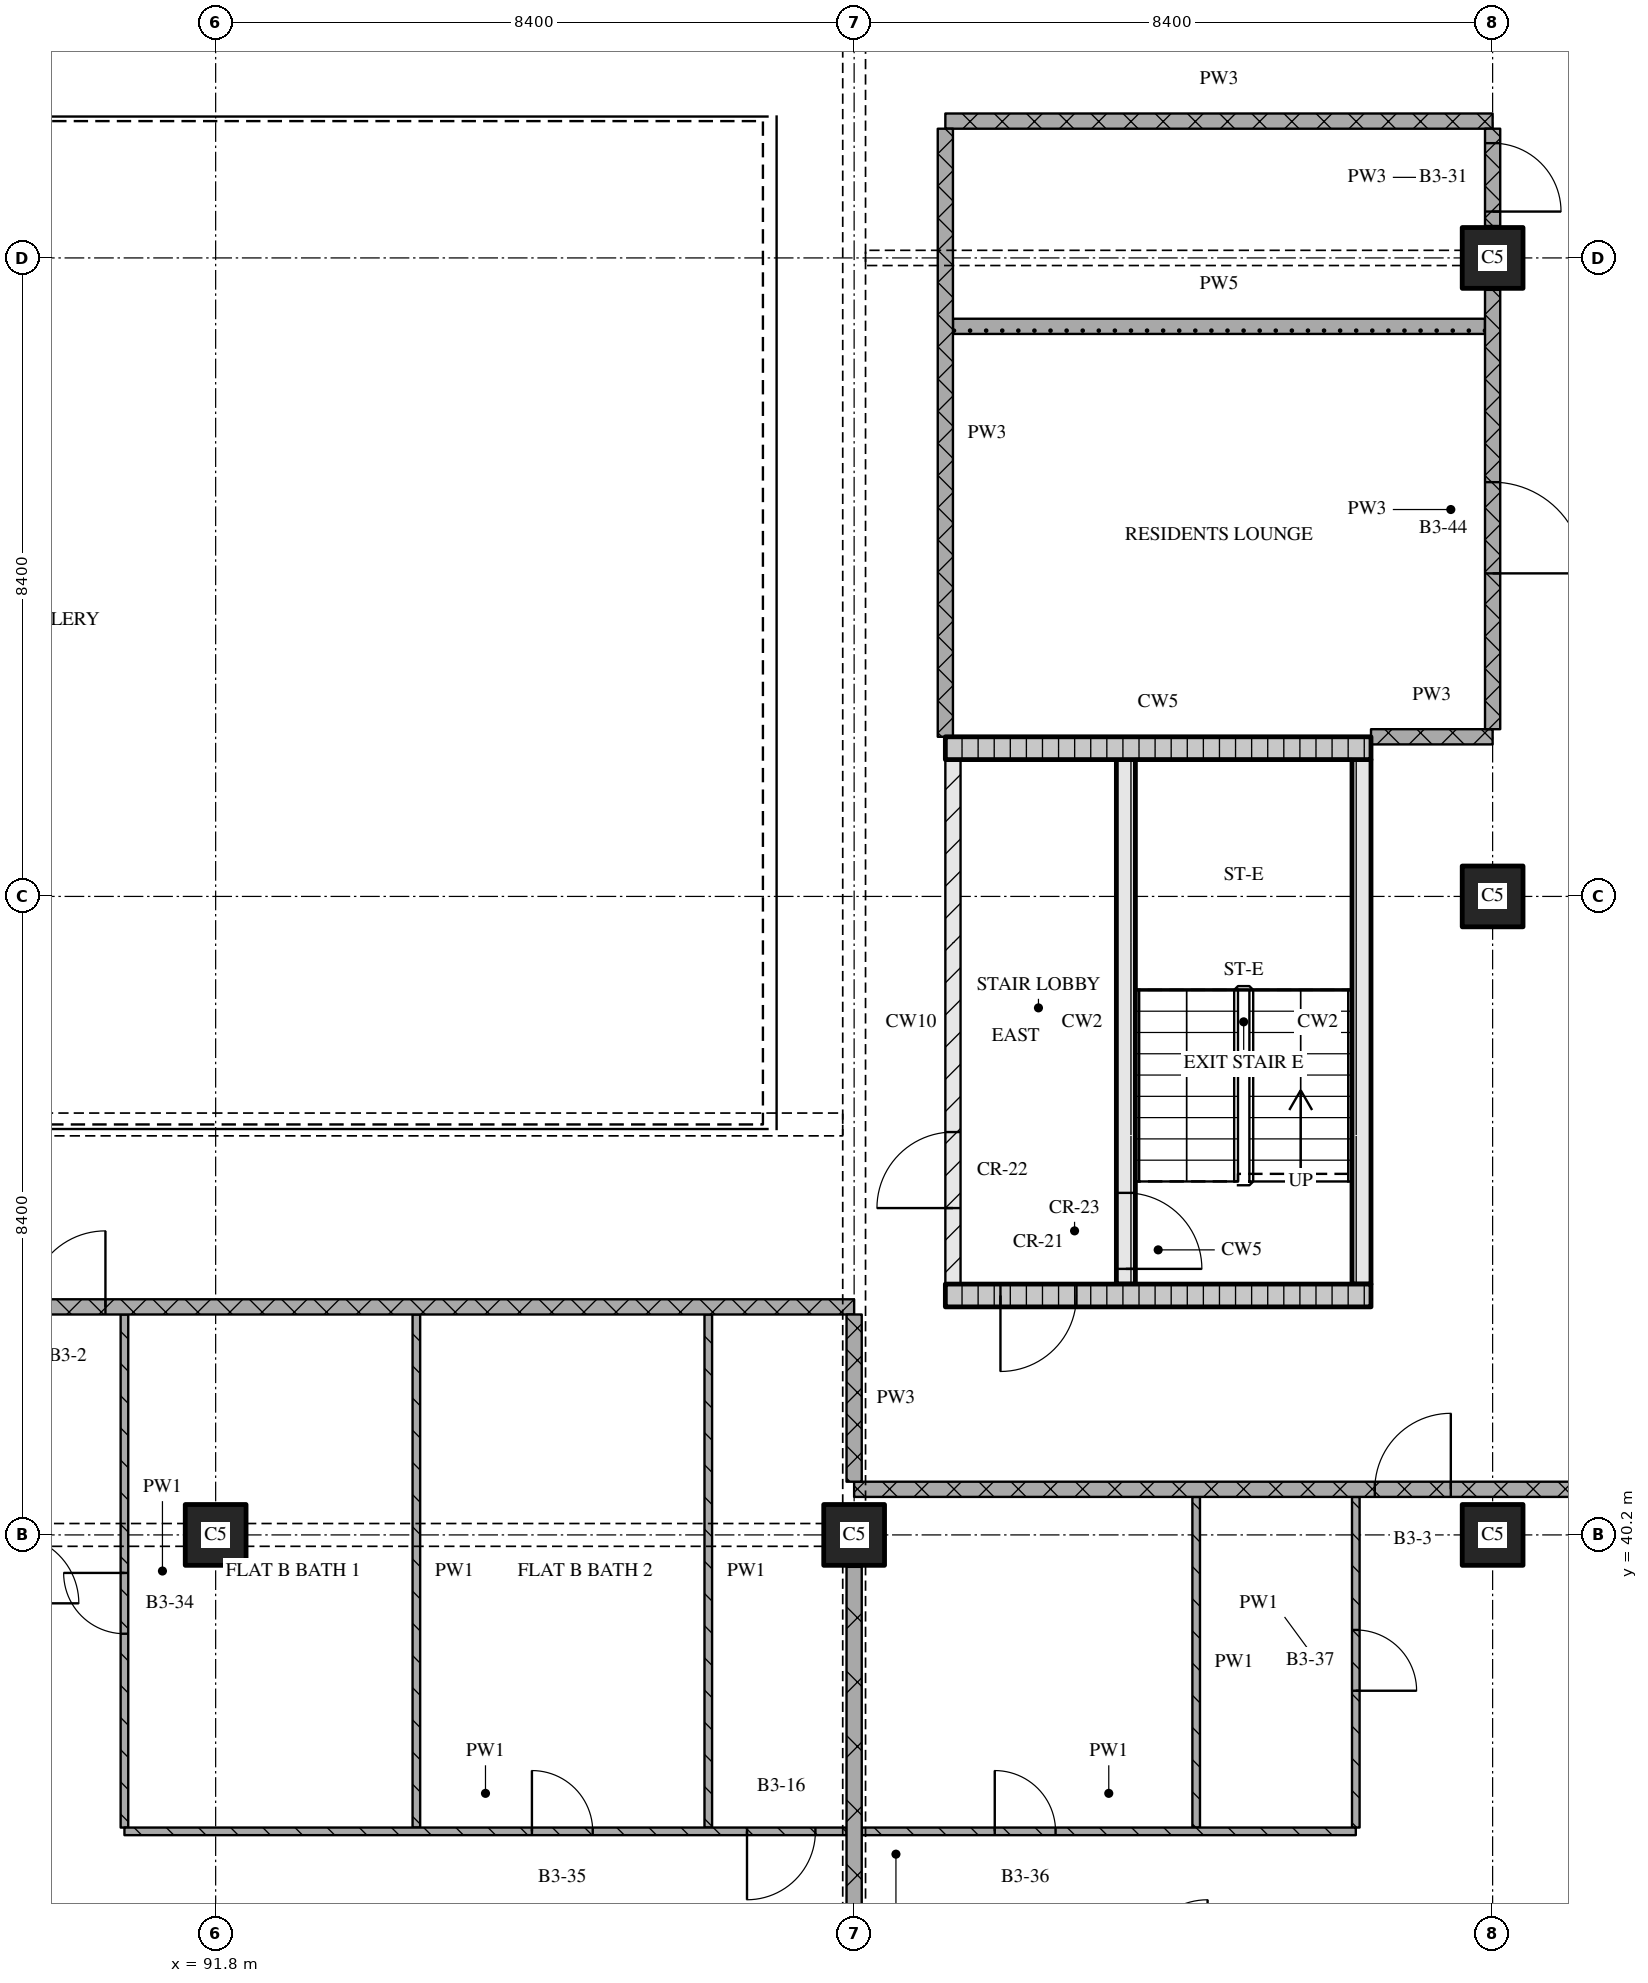
"""IFC4 building model, lengths in metres.
Left out: names, types, materials, properties, quantities, classifications, styles, units other than length and angle.
Written with IfcOpenShell. Run it as: python <this file> out.ifc"""

import sys

from ifc_helpers import new_model, si_unit, direction, frame, frame_2d, origin, origin_2d, place, context, subcontext, project, spatial, rectangle, extrude, element, fill, save


model = new_model("IFC4")
c1 = context("Model", 3, precision=1e-05, world=origin(), true_north=direction((0.0, 1.0)))
c2 = subcontext(c1, "Body", "Model", "MODEL_VIEW")
j1 = project(units=[si_unit("LENGTHUNIT", "METRE"), si_unit("PLANEANGLEUNIT", "RADIAN")], contexts=[c1])
p1 = place(None, origin())
s1 = spatial("IfcSite", under=j1, at=p1, CompositionType="ELEMENT")
p2 = place(p1, origin())
s2 = spatial("IfcBuilding", under=s1, at=p2, CompositionType="ELEMENT")
p3 = place(p2, frame((0.0, 0.0, 116.85)))
s3 = spatial("IfcBuildingStorey", under=s2, at=p3, CompositionType="ELEMENT", Elevation=116.85)
for number, where, z_axis, x_axis in (
    (1, (91.8, 40.2, 0.0), (0.0, 0.0, 1.0), (1.0, 0.0, 0.0)),
    (2, (100.2, 40.2, 0.0), (0.0, 0.0, 1.0), (1.0, 0.0, 0.0)),
    (3, (108.6, 40.2, 0.0), (0.0, 0.0, 1.0), (1.0, 0.0, 0.0)),
    (4, (108.6, 48.6, 0.0), (0.0, 0.0, 1.0), (1.0, 0.0, 0.0)),
    (5, (108.6, 57.0, 0.0), (0.0, 0.0, 1.0), (1.0, 0.0, 0.0)),
):
    element("IfcColumn", number, at=place(p3, frame(where, z_axis=z_axis, x_axis=x_axis)), inside=s3, PredefinedType="COLUMN", context=c2, shape_type="SweptSolid", body=[
        extrude(rectangle(XDim=0.8, YDim=0.8, at=origin_2d()), origin(), (0.0, 0.0, 1.0), 3.6),
    ])
p4 = place(p3, frame((101.4, 43.35, 0.0), z_axis=(0.0, 0.0, 1.0), x_axis=(1.0, 0.0, 0.0)))
e6 = element("IfcWall", 6, at=p4, inside=s3, PredefinedType="SOLIDWALL", context=c2, shape_type="SweptSolid", body=[
    extrude(rectangle(XDim=5.6, YDim=0.3, at=frame_2d((2.8, 0.0))), origin(), (0.0, 0.0, 1.0), 3.32),
])
p5 = place(p4, frame((0.725, 0.0, 0.0)))
e7 = element("IfcOpeningElement", 7, at=p5, cuts=e6, PredefinedType="OPENING", context=c2, shape_type="SweptSolid", body=[
    extrude(rectangle(XDim=1.0, YDim=2.1, at=frame_2d((0.5, 1.05))), frame((0.0, 0.16, 0.0), z_axis=(0.0, -1.0, 0.0), x_axis=(1.0, 0.0, 0.0)), (0.0, 0.0, 1.0), 0.32),
])
p6 = place(p3, frame((101.5, 43.5, 0.0), z_axis=(0.0, 0.0, 1.0), x_axis=(0.0, 1.0, 0.0)))
e8 = element("IfcWall", 8, at=p6, inside=s3, PredefinedType="PARTITIONING", context=c2, shape_type="SweptSolid", body=[
    extrude(rectangle(XDim=6.9, YDim=0.2, at=frame_2d((3.45, 0.0))), origin(), (0.0, 0.0, 1.0), 3.32),
])
p7 = place(p6, frame((1.0, 0.0, 0.0)))
e9 = element("IfcOpeningElement", 9, at=p7, cuts=e8, PredefinedType="OPENING", context=c2, shape_type="SweptSolid", body=[
    extrude(rectangle(XDim=1.0, YDim=2.1, at=frame_2d((0.5, 1.05))), frame((0.0, 0.11, 0.0), z_axis=(0.0, -1.0, 0.0), x_axis=(1.0, 0.0, 0.0)), (0.0, 0.0, 1.0), 0.22),
])
p8 = place(p3, frame((103.775, 43.5, 0.0), z_axis=(0.0, 0.0, 1.0), x_axis=(0.0, 1.0, 0.0)))
e10 = element("IfcWall", 10, at=p8, inside=s3, PredefinedType="SOLIDWALL", context=c2, shape_type="SweptSolid", body=[
    extrude(rectangle(XDim=6.9, YDim=0.25, at=frame_2d((3.45, 0.0))), origin(), (0.0, 0.0, 1.0), 3.32),
])
p9 = place(p8, frame((0.2, 0.0, 0.0)))
e11 = element("IfcOpeningElement", 11, at=p9, cuts=e10, PredefinedType="OPENING", context=c2, shape_type="SweptSolid", body=[
    extrude(rectangle(XDim=1.0, YDim=2.1, at=frame_2d((0.5, 1.05))), frame((0.0, 0.135, 0.0), z_axis=(0.0, -1.0, 0.0), x_axis=(1.0, 0.0, 0.0)), (0.0, 0.0, 1.0), 0.27),
])
p10 = place(p3, frame((106.875, 43.5, 0.0), z_axis=(0.0, 0.0, 1.0), x_axis=(0.0, 1.0, 0.0)))
e12 = element("IfcWall", 12, at=p10, inside=s3, PredefinedType="SOLIDWALL", context=c2, shape_type="SweptSolid", body=[
    extrude(rectangle(XDim=6.9, YDim=0.25, at=frame_2d((3.45, 0.0))), origin(), (0.0, 0.0, 1.0), 3.32),
])
p11 = place(p3, frame((101.4, 50.55, 0.0), z_axis=(0.0, 0.0, 1.0), x_axis=(1.0, 0.0, 0.0)))
e13 = element("IfcWall", 13, at=p11, inside=s3, PredefinedType="SOLIDWALL", context=c2, shape_type="SweptSolid", body=[
    extrude(rectangle(XDim=5.6, YDim=0.3, at=frame_2d((2.8, 0.0))), origin(), (0.0, 0.0, 1.0), 3.32),
])
p12 = place(p3, frame((124.38, 40.8, 0.0), z_axis=(0.0, 0.0, 1.0), x_axis=(-1.0, 0.0, 0.0)))
e14 = element("IfcWall", 14, at=p12, inside=s3, PredefinedType="PARTITIONING", context=c2, shape_type="SweptSolid", body=[
    extrude(rectangle(XDim=24.18, YDim=0.2, at=frame_2d((12.09, 0.0))), origin(), (0.0, 0.0, 1.0), 3.32),
])
p13 = place(p12, frame((16.33, 0.0, 0.0)))
e15 = element("IfcOpeningElement", 15, at=p13, cuts=e14, PredefinedType="OPENING", context=c2, shape_type="SweptSolid", body=[
    extrude(rectangle(XDim=1.0, YDim=2.1, at=frame_2d((0.5, 1.05))), frame((0.0, 0.11, 0.0), z_axis=(0.0, -1.0, 0.0), x_axis=(1.0, 0.0, 0.0)), (0.0, 0.0, 1.0), 0.22),
])
p14 = place(p3, frame((100.2, 43.2, 0.0), z_axis=(0.0, 0.0, 1.0), x_axis=(-1.0, 0.0, 0.0)))
e16 = element("IfcWall", 16, at=p14, inside=s3, PredefinedType="PARTITIONING", context=c2, shape_type="SweptSolid", body=[
    extrude(rectangle(XDim=25.2, YDim=0.2, at=frame_2d((12.6, 0.0))), origin(), (0.0, 0.0, 1.0), 3.32),
])
p15 = place(p14, frame((9.85, 0.0, 0.0)))
e17 = element("IfcOpeningElement", 17, at=p15, cuts=e16, PredefinedType="OPENING", context=c2, shape_type="SweptSolid", body=[
    extrude(rectangle(XDim=1.0, YDim=2.1, at=frame_2d((0.5, 1.05))), frame((0.0, 0.11, 0.0), z_axis=(0.0, -1.0, 0.0), x_axis=(1.0, 0.0, 0.0)), (0.0, 0.0, 1.0), 0.22),
])
p16 = place(p3, frame((107.0, 50.7, 0.0), z_axis=(0.0, 0.0, 1.0), x_axis=(1.0, 0.0, 0.0)))
e18 = element("IfcWall", 18, at=p16, inside=s3, PredefinedType="PARTITIONING", context=c2, shape_type="SweptSolid", body=[
    extrude(rectangle(XDim=1.6, YDim=0.2, at=frame_2d((0.8, 0.0))), origin(), (0.0, 0.0, 1.0), 3.32),
])
p17 = place(p3, frame((101.5, 56.1, 0.0), z_axis=(0.0, 0.0, 1.0), x_axis=(1.0, 0.0, 0.0)))
e19 = element("IfcWall", 19, at=p17, inside=s3, PredefinedType="PARTITIONING", context=c2, shape_type="SweptSolid", body=[
    extrude(rectangle(XDim=7.0, YDim=0.2, at=frame_2d((3.5, 0.0))), origin(), (0.0, 0.0, 1.0), 3.32),
])
p18 = place(p3, frame((101.4, 58.8, 0.0), z_axis=(0.0, 0.0, 1.0), x_axis=(1.0, 0.0, 0.0)))
e20 = element("IfcWall", 20, at=p18, inside=s3, PredefinedType="PARTITIONING", context=c2, shape_type="SweptSolid", body=[
    extrude(rectangle(XDim=7.2, YDim=0.2, at=frame_2d((3.6, 0.0))), origin(), (0.0, 0.0, 1.0), 3.32),
])
p19 = place(p3, frame((90.6, 43.1, 0.0), z_axis=(0.0, 0.0, 1.0), x_axis=(0.0, -1.0, 0.0)))
e21 = element("IfcWall", 21, at=p19, inside=s3, PredefinedType="PARTITIONING", context=c2, shape_type="SweptSolid", body=[
    extrude(rectangle(XDim=6.75, YDim=0.1, at=frame_2d((3.375, 0.0))), origin(), (0.0, 0.0, 1.0), 3.32),
])
p20 = place(p19, frame((3.4, 0.0, 0.0)))
e22 = element("IfcOpeningElement", 22, at=p20, cuts=e21, PredefinedType="OPENING", context=c2, shape_type="SweptSolid", body=[
    extrude(rectangle(XDim=0.8, YDim=2.1, at=frame_2d((0.4, 1.05))), frame((0.0, 0.06, 0.0), z_axis=(0.0, -1.0, 0.0), x_axis=(1.0, 0.0, 0.0)), (0.0, 0.0, 1.0), 0.12),
])
for number, where, z_axis, x_axis in (
    (23, (94.441, 43.1, 0.0), (0.0, 0.0, 1.0), (0.0, -1.0, 0.0)),
    (24, (98.281, 43.1, 0.0), (0.0, 0.0, 1.0), (0.0, -1.0, 0.0)),
):
    element("IfcWall", number, at=place(p3, frame(where, z_axis=z_axis, x_axis=x_axis)), inside=s3, PredefinedType="PARTITIONING", context=c2, shape_type="SweptSolid", body=[
        extrude(rectangle(XDim=6.75, YDim=0.1, at=frame_2d((3.375, 0.0))), origin(), (0.0, 0.0, 1.0), 3.32),
    ])
p21 = place(p3, frame((100.2, 43.1, 0.0), z_axis=(0.0, 0.0, 1.0), x_axis=(0.0, -1.0, 0.0)))
e25 = element("IfcWall", 25, at=p21, inside=s3, PredefinedType="PARTITIONING", context=c2, shape_type="SweptSolid", body=[
    extrude(rectangle(XDim=2.2, YDim=0.2, at=frame_2d((1.1, 0.0))), origin(), (0.0, 0.0, 1.0), 2.43),
])
p22 = place(p3, frame((100.2, 39.78, 0.0), z_axis=(0.0, 0.0, 1.0), x_axis=(0.0, -1.0, 0.0)))
e26 = element("IfcWall", 26, at=p22, inside=s3, PredefinedType="PARTITIONING", context=c2, shape_type="SweptSolid", body=[
    extrude(rectangle(XDim=7.56, YDim=0.2, at=frame_2d((3.78, 0.0))), origin(), (0.0, 0.0, 1.0), 2.83),
])
p23 = place(p3, frame((101.4, 58.7, 0.0), z_axis=(0.0, 0.0, 1.0), x_axis=(0.0, -1.0, 0.0)))
e27 = element("IfcWall", 27, at=p23, inside=s3, PredefinedType="PARTITIONING", context=c2, shape_type="SweptSolid", body=[
    extrude(rectangle(XDim=8.0, YDim=0.2, at=frame_2d((4.0, 0.0))), origin(), (0.0, 0.0, 1.0), 3.32),
])
p24 = place(p3, frame((104.7, 40.7, 0.0), z_axis=(0.0, 0.0, 1.0), x_axis=(0.0, -1.0, 0.0)))
e28 = element("IfcWall", 28, at=p24, inside=s3, PredefinedType="PARTITIONING", context=c2, shape_type="SweptSolid", body=[
    extrude(rectangle(XDim=4.35, YDim=0.1, at=frame_2d((2.175, 0.0))), origin(), (0.0, 0.0, 1.0), 3.32),
])
p25 = place(p3, frame((106.8, 36.35, 0.0), z_axis=(0.0, 0.0, 1.0), x_axis=(0.0, 1.0, 0.0)))
e29 = element("IfcWall", 29, at=p25, inside=s3, PredefinedType="PARTITIONING", context=c2, shape_type="SweptSolid", body=[
    extrude(rectangle(XDim=4.35, YDim=0.1, at=frame_2d((2.175, 0.0))), origin(), (0.0, 0.0, 1.0), 3.32),
])
p26 = place(p25, frame((1.8, 0.0, 0.0)))
e30 = element("IfcOpeningElement", 30, at=p26, cuts=e29, PredefinedType="OPENING", context=c2, shape_type="SweptSolid", body=[
    extrude(rectangle(XDim=0.8, YDim=2.1, at=frame_2d((0.4, 1.05))), frame((0.0, 0.06, 0.0), z_axis=(0.0, -1.0, 0.0), x_axis=(1.0, 0.0, 0.0)), (0.0, 0.0, 1.0), 0.12),
])
p27 = place(p3, frame((108.6, 50.8, 0.0), z_axis=(0.0, 0.0, 1.0), x_axis=(0.0, 1.0, 0.0)))
e31 = element("IfcWall", 31, at=p27, inside=s3, PredefinedType="PARTITIONING", context=c2, shape_type="SweptSolid", body=[
    extrude(rectangle(XDim=5.78, YDim=0.2, at=frame_2d((2.89, 0.0))), origin(), (0.0, 0.0, 1.0), 3.32),
])
p28 = place(p27, frame((2.05, 0.0, 0.0)))
e32 = element("IfcOpeningElement", 32, at=p28, cuts=e31, PredefinedType="OPENING", context=c2, shape_type="SweptSolid", body=[
    extrude(rectangle(XDim=1.2, YDim=2.1, at=frame_2d((0.6, 1.05))), frame((0.0, 0.11, 0.0), z_axis=(0.0, -1.0, 0.0), x_axis=(1.0, 0.0, 0.0)), (0.0, 0.0, 1.0), 0.22),
])
p29 = place(p3, frame((108.6, 57.42, 0.0), z_axis=(0.0, 0.0, 1.0), x_axis=(0.0, 1.0, 0.0)))
e33 = element("IfcWall", 33, at=p29, inside=s3, PredefinedType="PARTITIONING", context=c2, shape_type="SweptSolid", body=[
    extrude(rectangle(XDim=1.28, YDim=0.2, at=frame_2d((0.64, 0.0))), origin(), (0.0, 0.0, 1.0), 3.32),
])
p30 = place(p29, frame((0.19, 0.0, 0.0)))
e34 = element("IfcOpeningElement", 34, at=p30, cuts=e33, PredefinedType="OPENING", context=c2, shape_type="SweptSolid", body=[
    extrude(rectangle(XDim=0.9, YDim=2.1, at=frame_2d((0.45, 1.05))), frame((0.0, 0.11, 0.0), z_axis=(0.0, -1.0, 0.0), x_axis=(1.0, 0.0, 0.0)), (0.0, 0.0, 1.0), 0.22),
])
p31 = place(p3, frame((90.6, 36.3, 0.0), z_axis=(0.0, 0.0, 1.0), x_axis=(1.0, 0.0, 0.0)))
e35 = element("IfcWall", 35, at=p31, inside=s3, PredefinedType="PARTITIONING", context=c2, shape_type="SweptSolid", body=[
    extrude(rectangle(XDim=9.5, YDim=0.1, at=frame_2d((4.75, 0.0))), origin(), (0.0, 0.0, 1.0), 3.32),
])
p32 = place(p31, frame((5.361, 0.0, 0.0)))
e36 = element("IfcOpeningElement", 36, at=p32, cuts=e35, PredefinedType="OPENING", context=c2, shape_type="SweptSolid", body=[
    extrude(rectangle(XDim=0.8, YDim=2.1, at=frame_2d((0.4, 1.05))), frame((0.0, 0.06, 0.0), z_axis=(0.0, -1.0, 0.0), x_axis=(1.0, 0.0, 0.0)), (0.0, 0.0, 1.0), 0.12),
])
p33 = place(p31, frame((8.191, 0.0, 0.0)))
e37 = element("IfcOpeningElement", 37, at=p33, cuts=e35, PredefinedType="OPENING", context=c2, shape_type="SweptSolid", body=[
    extrude(rectangle(XDim=0.9, YDim=2.1, at=frame_2d((0.45, 1.05))), frame((0.0, 0.06, 0.0), z_axis=(0.0, -1.0, 0.0), x_axis=(1.0, 0.0, 0.0)), (0.0, 0.0, 1.0), 0.12),
])
p34 = place(p3, frame((100.3, 36.3, 0.0), z_axis=(0.0, 0.0, 1.0), x_axis=(1.0, 0.0, 0.0)))
e38 = element("IfcWall", 38, at=p34, inside=s3, PredefinedType="PARTITIONING", context=c2, shape_type="SweptSolid", body=[
    extrude(rectangle(XDim=6.5, YDim=0.1, at=frame_2d((3.25, 0.0))), origin(), (0.0, 0.0, 1.0), 3.32),
])
p35 = place(p34, frame((1.75, 0.0, 0.0)))
e39 = element("IfcOpeningElement", 39, at=p35, cuts=e38, PredefinedType="OPENING", context=c2, shape_type="SweptSolid", body=[
    extrude(rectangle(XDim=0.8, YDim=2.1, at=frame_2d((0.4, 1.05))), frame((0.0, 0.06, 0.0), z_axis=(0.0, -1.0, 0.0), x_axis=(1.0, 0.0, 0.0)), (0.0, 0.0, 1.0), 0.12),
])
p36 = place(p5, origin())
e40 = element("IfcDoor", 40, at=p36, inside=s3, OperationType="SINGLE_SWING_RIGHT", PredefinedType="DOOR", context=c2, shape_type="SweptSolid", body=[
    extrude(rectangle(XDim=1.0, YDim=2.1, at=frame_2d((0.5, 1.05))), frame((0.0, 0.025, 0.0), z_axis=(0.0, -1.0, 0.0), x_axis=(1.0, 0.0, 0.0)), (0.0, 0.0, 1.0), 0.05),
])
fill(e7, e40)
p37 = place(p9, origin())
e41 = element("IfcDoor", 41, at=p37, inside=s3, OperationType="SINGLE_SWING_RIGHT", PredefinedType="DOOR", context=c2, shape_type="SweptSolid", body=[
    extrude(rectangle(XDim=1.0, YDim=2.1, at=frame_2d((0.5, 1.05))), frame((0.0, 0.025, 0.0), z_axis=(0.0, -1.0, 0.0), x_axis=(1.0, 0.0, 0.0)), (0.0, 0.0, 1.0), 0.05),
])
fill(e11, e41)
p38 = place(p7, origin())
e42 = element("IfcDoor", 42, at=p38, inside=s3, OperationType="SINGLE_SWING_LEFT", PredefinedType="DOOR", context=c2, shape_type="SweptSolid", body=[
    extrude(rectangle(XDim=1.0, YDim=2.1, at=frame_2d((0.5, 1.05))), frame((0.0, 0.025, 0.0), z_axis=(0.0, -1.0, 0.0), x_axis=(1.0, 0.0, 0.0)), (0.0, 0.0, 1.0), 0.05),
])
fill(e9, e42)
p39 = place(p13, origin())
e43 = element("IfcDoor", 43, at=p39, inside=s3, OperationType="SINGLE_SWING_RIGHT", PredefinedType="DOOR", context=c2, shape_type="SweptSolid", body=[
    extrude(rectangle(XDim=1.0, YDim=2.1, at=frame_2d((0.5, 1.05))), frame((0.0, 0.025, 0.0), z_axis=(0.0, -1.0, 0.0), x_axis=(1.0, 0.0, 0.0)), (0.0, 0.0, 1.0), 0.05),
])
fill(e15, e43)
p40 = place(p15, origin())
e44 = element("IfcDoor", 44, at=p40, inside=s3, OperationType="SINGLE_SWING_RIGHT", PredefinedType="DOOR", context=c2, shape_type="SweptSolid", body=[
    extrude(rectangle(XDim=1.0, YDim=2.1, at=frame_2d((0.5, 1.05))), frame((0.0, 0.025, 0.0), z_axis=(0.0, -1.0, 0.0), x_axis=(1.0, 0.0, 0.0)), (0.0, 0.0, 1.0), 0.05),
])
fill(e17, e44)
p41 = place(p20, origin())
e45 = element("IfcDoor", 45, at=p41, inside=s3, OperationType="SINGLE_SWING_RIGHT", PredefinedType="DOOR", context=c2, shape_type="SweptSolid", body=[
    extrude(rectangle(XDim=0.8, YDim=2.1, at=frame_2d((0.4, 1.05))), frame((0.0, 0.025, 0.0), z_axis=(0.0, -1.0, 0.0), x_axis=(1.0, 0.0, 0.0)), (0.0, 0.0, 1.0), 0.05),
])
fill(e22, e45)
p42 = place(p26, origin())
e46 = element("IfcDoor", 46, at=p42, inside=s3, OperationType="SINGLE_SWING_RIGHT", PredefinedType="DOOR", context=c2, shape_type="SweptSolid", body=[
    extrude(rectangle(XDim=0.8, YDim=2.1, at=frame_2d((0.4, 1.05))), frame((0.0, 0.025, 0.0), z_axis=(0.0, -1.0, 0.0), x_axis=(1.0, 0.0, 0.0)), (0.0, 0.0, 1.0), 0.05),
])
fill(e30, e46)
p43 = place(p28, origin())
e47 = element("IfcDoor", 47, at=p43, inside=s3, OperationType="SINGLE_SWING_RIGHT", PredefinedType="DOOR", context=c2, shape_type="SweptSolid", body=[
    extrude(rectangle(XDim=1.2, YDim=2.1, at=frame_2d((0.6, 1.05))), frame((0.0, 0.025, 0.0), z_axis=(0.0, -1.0, 0.0), x_axis=(1.0, 0.0, 0.0)), (0.0, 0.0, 1.0), 0.05),
])
fill(e32, e47)
p44 = place(p30, origin())
e48 = element("IfcDoor", 48, at=p44, inside=s3, OperationType="SINGLE_SWING_RIGHT", PredefinedType="DOOR", context=c2, shape_type="SweptSolid", body=[
    extrude(rectangle(XDim=0.9, YDim=2.1, at=frame_2d((0.45, 1.05))), frame((0.0, 0.025, 0.0), z_axis=(0.0, -1.0, 0.0), x_axis=(1.0, 0.0, 0.0)), (0.0, 0.0, 1.0), 0.05),
])
fill(e34, e48)
p45 = place(p32, origin())
e49 = element("IfcDoor", 49, at=p45, inside=s3, OperationType="SINGLE_SWING_LEFT", PredefinedType="DOOR", context=c2, shape_type="SweptSolid", body=[
    extrude(rectangle(XDim=0.8, YDim=2.1, at=frame_2d((0.4, 1.05))), frame((0.0, 0.025, 0.0), z_axis=(0.0, -1.0, 0.0), x_axis=(1.0, 0.0, 0.0)), (0.0, 0.0, 1.0), 0.05),
])
fill(e36, e49)
p46 = place(p33, origin())
e50 = element("IfcDoor", 50, at=p46, inside=s3, OperationType="SINGLE_SWING_RIGHT", PredefinedType="DOOR", context=c2, shape_type="SweptSolid", body=[
    extrude(rectangle(XDim=0.9, YDim=2.1, at=frame_2d((0.45, 1.05))), frame((0.0, 0.025, 0.0), z_axis=(0.0, -1.0, 0.0), x_axis=(1.0, 0.0, 0.0)), (0.0, 0.0, 1.0), 0.05),
])
fill(e37, e50)
p47 = place(p35, origin())
e51 = element("IfcDoor", 51, at=p47, inside=s3, OperationType="SINGLE_SWING_LEFT", PredefinedType="DOOR", context=c2, shape_type="SweptSolid", body=[
    extrude(rectangle(XDim=0.8, YDim=2.1, at=frame_2d((0.4, 1.05))), frame((0.0, 0.025, 0.0), z_axis=(0.0, -1.0, 0.0), x_axis=(1.0, 0.0, 0.0)), (0.0, 0.0, 1.0), 0.05),
])
fill(e39, e51)
save(model, sys.argv[1])
